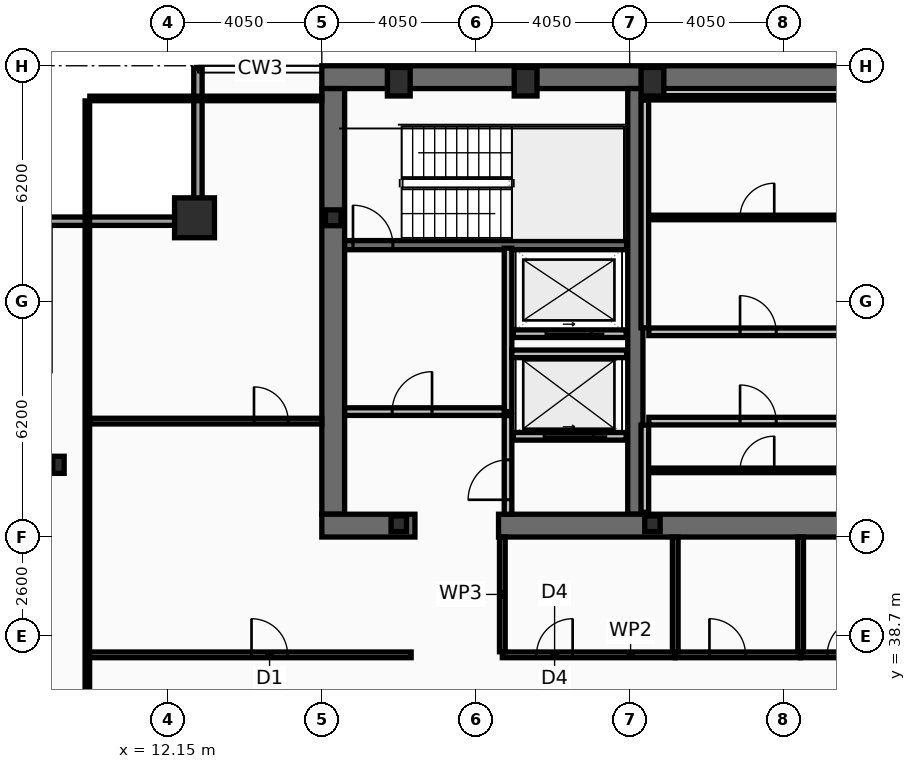
"""IFC4 building model, lengths in metres.
Left out: names, types, materials, properties, quantities, classifications, styles, units other than length and angle.
Written with IfcOpenShell. Run it as: python <this file> out.ifc"""

import sys

from ifc_helpers import new_model, si_unit, direction, frame, frame_2d, origin, origin_2d, place, context, subcontext, project, spatial, rectangle, hollow_rectangle, i_section, extrude, element, fill, save


model = new_model("IFC4")
c1 = context("Model", 3, precision=1e-05, world=origin(), true_north=direction((0.0, 1.0)))
c2 = subcontext(c1, "Body", "Model", "MODEL_VIEW")
j1 = project(units=[si_unit("LENGTHUNIT", "METRE"), si_unit("PLANEANGLEUNIT", "RADIAN")], contexts=[c1])
p1 = place(None, origin())
s1 = spatial("IfcSite", under=j1, at=p1, CompositionType="ELEMENT")
p2 = place(p1, origin())
s2 = spatial("IfcBuilding", under=s1, at=p2, CompositionType="ELEMENT")
p3 = place(p2, frame((0.0, 0.0, 246.2)))
s3 = spatial("IfcBuildingStorey", under=s2, at=p3, CompositionType="ELEMENT", Elevation=246.2)
p4 = place(p3, frame((16.2, 53.4, 0.0), z_axis=(0.0, 0.0, 1.0), x_axis=(1.0, 0.0, 0.0)))
e1 = element("IfcWall", 1, at=p4, inside=s3, PredefinedType="SHEAR", context=c2, shape_type="SweptSolid", body=[
    extrude(rectangle(XDim=40.5, YDim=0.6, at=frame_2d((20.25, 0.0))), origin(), (0.0, 0.0, 1.0), 3.44),
])
p5 = place(p3, frame((16.5, 41.9, 0.0), z_axis=(0.0, 0.0, 1.0), x_axis=(0.0, 1.0, 0.0)))
e2 = element("IfcWall", 2, at=p5, inside=s3, PredefinedType="SHEAR", context=c2, shape_type="SweptSolid", body=[
    extrude(rectangle(XDim=11.2, YDim=0.6, at=frame_2d((5.6, 0.0))), origin(), (0.0, 0.0, 1.0), 3.44),
])
p6 = place(p3, frame((24.45, 41.9, 0.0), z_axis=(0.0, 0.0, 1.0), x_axis=(0.0, 1.0, 0.0)))
e3 = element("IfcWall", 3, at=p6, inside=s3, PredefinedType="SHEAR", context=c2, shape_type="SweptSolid", body=[
    extrude(rectangle(XDim=11.2, YDim=0.4, at=frame_2d((5.6, 0.0))), origin(), (0.0, 0.0, 1.0), 3.44),
])
p7 = place(p3, frame((18.65, 41.6, 0.0), z_axis=(0.0, 0.0, 1.0), x_axis=(-1.0, 0.0, 0.0)))
e4 = element("IfcWall", 4, at=p7, inside=s3, PredefinedType="SHEAR", context=c2, shape_type="SweptSolid", body=[
    extrude(rectangle(XDim=2.45, YDim=0.6, at=frame_2d((1.225, 0.0))), origin(), (0.0, 0.0, 1.0), 3.44),
])
p8 = place(p3, frame((32.3, 41.6, 0.0), z_axis=(0.0, 0.0, 1.0), x_axis=(-1.0, 0.0, 0.0)))
e5 = element("IfcWall", 5, at=p8, inside=s3, PredefinedType="SHEAR", context=c2, shape_type="SweptSolid", body=[
    extrude(rectangle(XDim=11.45, YDim=0.6, at=frame_2d((5.725, 0.0))), origin(), (0.0, 0.0, 1.0), 3.44),
])
p9 = place(p3, frame((16.8, 48.98, 0.0), z_axis=(0.0, 0.0, 1.0), x_axis=(1.0, 0.0, 0.0)))
e6 = element("IfcWall", 6, at=p9, inside=s3, PredefinedType="SHEAR", context=c2, shape_type="SweptSolid", body=[
    extrude(rectangle(XDim=7.42, YDim=0.24, at=frame_2d((3.71, 0.0))), origin(), (0.0, 0.0, 1.0), 3.44),
])
p10 = place(p9, frame((0.22, 0.0, 0.0)))
e7 = element("IfcOpeningElement", 7, at=p10, cuts=e6, PredefinedType="OPENING", context=c2, shape_type="SweptSolid", body=[
    extrude(rectangle(XDim=1.05, YDim=2.15, at=frame_2d((0.525, 1.075))), frame((0.0, 0.13, 0.0), z_axis=(0.0, -1.0, 0.0), x_axis=(1.0, 0.0, 0.0)), (0.0, 0.0, 1.0), 0.26),
])
p11 = place(p3, frame((12.85, 49.7, 0.0), z_axis=(0.0, 0.0, 1.0), x_axis=(1.0, 0.0, 0.0)))
e8 = element("IfcColumn", 8, at=p11, inside=s3, PredefinedType="COLUMN", context=c2, shape_type="SweptSolid", body=[
    extrude(hollow_rectangle(XDim=1.05, YDim=1.05, WallThickness=0.055, at=origin_2d()), origin(), (0.0, 0.0, 1.0), 3.6),
])
for number, where, z_axis, x_axis in (
    (9, (18.225, 53.28, 0.0), (0.0, 0.0, 1.0), (1.0, 0.0, 0.0)),
    (10, (21.562, 53.28, 0.0), (0.0, 0.0, 1.0), (1.0, 0.0, 0.0)),
    (11, (24.9, 53.28, 0.0), (0.0, 0.0, 1.0), (1.0, 0.0, 0.0)),
):
    element("IfcColumn", number, at=place(p3, frame(where, z_axis=z_axis, x_axis=x_axis)), inside=s3, PredefinedType="COLUMN", context=c2, shape_type="SweptSolid", body=[
        extrude(hollow_rectangle(XDim=0.6, YDim=0.75, WallThickness=0.045, at=origin_2d()), origin(), (0.0, 0.0, 1.0), 3.6),
    ])
p12 = place(p3, frame((9.27, 43.2, 0.0), z_axis=(0.0, 0.0, 1.0), x_axis=(1.0, 0.0, 0.0)))
e12 = element("IfcColumn", 12, at=p12, inside=s3, PredefinedType="COLUMN", context=c2, shape_type="SweptSolid", body=[
    extrude(i_section(OverallWidth=0.3, OverallDepth=0.45, WebThickness=0.014, FlangeThickness=0.026, at=origin_2d()), origin(), (0.0, 0.0, 1.0), 3.6),
])
for number, where, z_axis, x_axis in (
    (13, (16.5, 49.7, 0.0), (0.0, 0.0, 1.0), (1.0, 0.0, 0.0)),
    (14, (18.225, 41.65, 0.0), (0.0, 0.0, 1.0), (1.0, 0.0, 0.0)),
    (15, (24.9, 41.65, 0.0), (0.0, 0.0, 1.0), (1.0, 0.0, 0.0)),
):
    element("IfcColumn", number, at=place(p3, frame(where, z_axis=z_axis, x_axis=x_axis)), inside=s3, PredefinedType="COLUMN", context=c2, shape_type="SweptSolid", body=[
        extrude(i_section(OverallWidth=0.406, OverallDepth=0.416, WebThickness=0.03, FlangeThickness=0.048, at=origin_2d()), origin(), (0.0, 0.0, 1.0), 3.6),
    ])
p13 = place(p3, frame((8.83, 49.61, 0.0), z_axis=(0.0, 0.0, 1.0), x_axis=(1.0, 0.0, 0.0)))
e16 = element("IfcWall", 16, at=p13, inside=s3, PredefinedType="SOLIDWALL", context=c2, shape_type="SweptSolid", body=[
    extrude(rectangle(XDim=4.22, YDim=0.22, at=frame_2d((2.11, 0.0))), origin(), (0.0, 0.0, 1.0), 2.83),
])
p14 = place(p3, frame((12.94, 49.72, 0.0), z_axis=(0.0, 0.0, 1.0), x_axis=(0.0, 1.0, 0.0)))
e17 = element("IfcWall", 17, at=p14, inside=s3, PredefinedType="SOLIDWALL", context=c2, shape_type="SweptSolid", body=[
    extrude(rectangle(XDim=3.91, YDim=0.22, at=frame_2d((1.955, 0.0))), origin(), (0.0, 0.0, 1.0), 2.83),
])
p15 = place(p3, frame((24.21, 43.95, 0.0), z_axis=(0.0, 0.0, 1.0), x_axis=(-1.0, 0.0, 0.0)))
e18 = element("IfcWall", 18, at=p15, inside=s3, PredefinedType="PARTITIONING", context=c2, shape_type="SweptSolid", body=[
    extrude(rectangle(XDim=2.97, YDim=0.2, at=frame_2d((1.485, 0.0))), origin(), (0.0, 0.0, 1.0), 3.44),
])
p16 = place(p15, frame((0.86, 0.0, 0.0)))
e19 = element("IfcOpeningElement", 19, at=p16, cuts=e18, PredefinedType="OPENING", context=c2, shape_type="SweptSolid", body=[
    extrude(rectangle(XDim=1.3, YDim=2.18, at=frame_2d((0.65, 1.09))), frame((0.0, 0.11, 0.0), z_axis=(0.0, -1.0, 0.0), x_axis=(1.0, 0.0, 0.0)), (0.0, 0.0, 1.0), 0.22),
])
p17 = place(p3, frame((24.21, 46.65, 0.0), z_axis=(0.0, 0.0, 1.0), x_axis=(-1.0, 0.0, 0.0)))
e20 = element("IfcWall", 20, at=p17, inside=s3, PredefinedType="PARTITIONING", context=c2, shape_type="SweptSolid", body=[
    extrude(rectangle(XDim=2.97, YDim=0.2, at=frame_2d((1.485, 0.0))), origin(), (0.0, 0.0, 1.0), 3.44),
])
p18 = place(p17, frame((0.91, 0.0, 0.0)))
e21 = element("IfcOpeningElement", 21, at=p18, cuts=e20, PredefinedType="OPENING", context=c2, shape_type="SweptSolid", body=[
    extrude(rectangle(XDim=1.2, YDim=2.18, at=frame_2d((0.6, 1.09))), frame((0.0, 0.11, 0.0), z_axis=(0.0, -1.0, 0.0), x_axis=(1.0, 0.0, 0.0)), (0.0, 0.0, 1.0), 0.22),
])
p19 = place(p3, frame((21.1, 44.6, 0.0), z_axis=(0.0, 0.0, 1.0), x_axis=(0.0, 1.0, 0.0)))
e22 = element("IfcWall", 22, at=p19, inside=s3, PredefinedType="PARTITIONING", context=c2, shape_type="SweptSolid", body=[
    extrude(rectangle(XDim=4.3, YDim=0.2, at=frame_2d((2.15, 0.0))), origin(), (0.0, 0.0, 1.0), 3.44),
])
p20 = place(p3, frame((16.8, 44.6, 0.0), z_axis=(0.0, 0.0, 1.0), x_axis=(1.0, 0.0, 0.0)))
e23 = element("IfcWall", 23, at=p20, inside=s3, PredefinedType="PARTITIONING", context=c2, shape_type="SweptSolid", body=[
    extrude(rectangle(XDim=4.2, YDim=0.2, at=frame_2d((2.1, 0.0))), origin(), (0.0, 0.0, 1.0), 3.44),
])
p21 = place(p20, frame((1.25, 0.0, 0.0)))
e24 = element("IfcOpeningElement", 24, at=p21, cuts=e23, PredefinedType="OPENING", context=c2, shape_type="SweptSolid", body=[
    extrude(rectangle(XDim=1.05, YDim=2.15, at=frame_2d((0.525, 1.075))), frame((0.0, 0.11, 0.0), z_axis=(0.0, -1.0, 0.0), x_axis=(1.0, 0.0, 0.0)), (0.0, 0.0, 1.0), 0.22),
])
p22 = place(p3, frame((21.2, 46.12, 0.0), z_axis=(0.0, 0.0, 1.0), x_axis=(1.0, 0.0, 0.0)))
e25 = element("IfcWall", 25, at=p22, inside=s3, PredefinedType="PARTITIONING", context=c2, shape_type="SweptSolid", body=[
    extrude(rectangle(XDim=3.02, YDim=0.2, at=frame_2d((1.51, 0.0))), origin(), (0.0, 0.0, 1.0), 3.44),
])
p23 = place(p3, frame((21.1, 41.9, 0.0), z_axis=(0.0, 0.0, 1.0), x_axis=(0.0, 1.0, 0.0)))
e26 = element("IfcWall", 26, at=p23, inside=s3, PredefinedType="PARTITIONING", context=c2, shape_type="SweptSolid", body=[
    extrude(rectangle(XDim=2.595, YDim=0.2, at=frame_2d((1.298, 0.0))), origin(), (0.0, 0.0, 1.0), 3.44),
])
p24 = place(p23, frame((0.38, 0.0, 0.0)))
e27 = element("IfcOpeningElement", 27, at=p24, cuts=e26, PredefinedType="OPENING", context=c2, shape_type="SweptSolid", body=[
    extrude(rectangle(XDim=1.05, YDim=2.15, at=frame_2d((0.525, 1.075))), frame((0.0, 0.11, 0.0), z_axis=(0.0, -1.0, 0.0), x_axis=(1.0, 0.0, 0.0)), (0.0, 0.0, 1.0), 0.22),
])
p25 = place(p3, frame((24.7, 46.805, 0.0), z_axis=(0.0, 0.0, 1.0), x_axis=(0.0, 1.0, 0.0)))
e28 = element("IfcWall", 28, at=p25, inside=s3, PredefinedType="PARTITIONING", context=c2, shape_type="SweptSolid", body=[
    extrude(rectangle(XDim=5.99, YDim=0.2, at=frame_2d((2.995, 0.0))), origin(), (0.0, 0.0, 1.0), 3.44),
])
p26 = place(p3, frame((24.805, 52.86, 0.0), z_axis=(0.0, 0.0, 1.0), x_axis=(1.0, 0.0, 0.0)))
e29 = element("IfcWall", 29, at=p26, inside=s3, PredefinedType="PARTITIONING", context=c2, shape_type="SweptSolid", body=[
    extrude(rectangle(XDim=7.51, YDim=0.12, at=frame_2d((3.755, 0.0))), origin(), (0.0, 0.0, 1.0), 3.44),
])
p27 = place(p3, frame((24.805, 49.709, 0.0), z_axis=(0.0, 0.0, 1.0), x_axis=(1.0, 0.0, 0.0)))
e30 = element("IfcWall", 30, at=p27, inside=s3, PredefinedType="PARTITIONING", context=c2, shape_type="SweptSolid", body=[
    extrude(rectangle(XDim=7.51, YDim=0.12, at=frame_2d((3.755, 0.0))), origin(), (0.0, 0.0, 1.0), 3.44),
])
p28 = place(p27, frame((2.4, 0.0, 0.0)))
e31 = element("IfcOpeningElement", 31, at=p28, cuts=e30, PredefinedType="OPENING", context=c2, shape_type="SweptSolid", body=[
    extrude(rectangle(XDim=0.9, YDim=2.05, at=frame_2d((0.45, 1.025))), frame((0.0, 0.07, 0.0), z_axis=(0.0, -1.0, 0.0), x_axis=(1.0, 0.0, 0.0)), (0.0, 0.0, 1.0), 0.14),
])
p29 = place(p3, frame((24.805, 46.7, 0.0), z_axis=(0.0, 0.0, 1.0), x_axis=(1.0, 0.0, 0.0)))
e32 = element("IfcWall", 32, at=p29, inside=s3, PredefinedType="PARTITIONING", context=c2, shape_type="SweptSolid", body=[
    extrude(rectangle(XDim=7.51, YDim=0.2, at=frame_2d((3.755, 0.0))), origin(), (0.0, 0.0, 1.0), 3.44),
])
p30 = place(p29, frame((2.4, 0.0, 0.0)))
e33 = element("IfcOpeningElement", 33, at=p30, cuts=e32, PredefinedType="OPENING", context=c2, shape_type="SweptSolid", body=[
    extrude(rectangle(XDim=0.95, YDim=2.1, at=frame_2d((0.475, 1.05))), frame((0.0, 0.11, 0.0), z_axis=(0.0, -1.0, 0.0), x_axis=(1.0, 0.0, 0.0)), (0.0, 0.0, 1.0), 0.22),
])
p31 = place(p3, frame((24.7, 41.95, 0.0), z_axis=(0.0, 0.0, 1.0), x_axis=(0.0, 1.0, 0.0)))
e34 = element("IfcWall", 34, at=p31, inside=s3, PredefinedType="PARTITIONING", context=c2, shape_type="SweptSolid", body=[
    extrude(rectangle(XDim=2.295, YDim=0.2, at=frame_2d((1.147, 0.0))), origin(), (0.0, 0.0, 1.0), 3.44),
])
p32 = place(p3, frame((24.805, 43.054, 0.0), z_axis=(0.0, 0.0, 1.0), x_axis=(1.0, 0.0, 0.0)))
e35 = element("IfcWall", 35, at=p32, inside=s3, PredefinedType="PARTITIONING", context=c2, shape_type="SweptSolid", body=[
    extrude(rectangle(XDim=7.34, YDim=0.12, at=frame_2d((3.67, 0.0))), origin(), (0.0, 0.0, 1.0), 3.44),
])
p33 = place(p32, frame((2.4, 0.0, 0.0)))
e36 = element("IfcOpeningElement", 36, at=p33, cuts=e35, PredefinedType="OPENING", context=c2, shape_type="SweptSolid", body=[
    extrude(rectangle(XDim=0.9, YDim=2.05, at=frame_2d((0.45, 1.025))), frame((0.0, 0.07, 0.0), z_axis=(0.0, -1.0, 0.0), x_axis=(1.0, 0.0, 0.0)), (0.0, 0.0, 1.0), 0.14),
])
p34 = place(p3, frame((24.805, 44.35, 0.0), z_axis=(0.0, 0.0, 1.0), x_axis=(1.0, 0.0, 0.0)))
e37 = element("IfcWall", 37, at=p34, inside=s3, PredefinedType="PARTITIONING", context=c2, shape_type="SweptSolid", body=[
    extrude(rectangle(XDim=7.34, YDim=0.2, at=frame_2d((3.67, 0.0))), origin(), (0.0, 0.0, 1.0), 3.44),
])
p35 = place(p34, frame((2.4, 0.0, 0.0)))
e38 = element("IfcOpeningElement", 38, at=p35, cuts=e37, PredefinedType="OPENING", context=c2, shape_type="SweptSolid", body=[
    extrude(rectangle(XDim=0.95, YDim=2.1, at=frame_2d((0.475, 1.05))), frame((0.0, 0.11, 0.0), z_axis=(0.0, -1.0, 0.0), x_axis=(1.0, 0.0, 0.0)), (0.0, 0.0, 1.0), 0.22),
])
p36 = place(p3, frame((20.95, 38.2, 0.0), z_axis=(0.0, 0.0, 1.0), x_axis=(1.0, 0.0, 0.0)))
e39 = element("IfcWall", 39, at=p36, inside=s3, PredefinedType="PARTITIONING", context=c2, shape_type="SweptSolid", body=[
    extrude(rectangle(XDim=4.55, YDim=0.15, at=frame_2d((2.275, 0.0))), origin(), (0.0, 0.0, 1.0), 2.78),
])
p37 = place(p36, frame((0.9, 0.0, 0.0)))
e40 = element("IfcOpeningElement", 40, at=p37, cuts=e39, PredefinedType="OPENING", context=c2, shape_type="SweptSolid", body=[
    extrude(rectangle(XDim=0.95, YDim=2.05, at=frame_2d((0.475, 1.025))), frame((0.0, 0.085, 0.0), z_axis=(0.0, -1.0, 0.0), x_axis=(1.0, 0.0, 0.0)), (0.0, 0.0, 1.0), 0.17),
])
p38 = place(p3, frame((25.5, 38.2, 0.0), z_axis=(0.0, 0.0, 1.0), x_axis=(1.0, 0.0, 0.0)))
e41 = element("IfcWall", 41, at=p38, inside=s3, PredefinedType="PARTITIONING", context=c2, shape_type="SweptSolid", body=[
    extrude(rectangle(XDim=3.3, YDim=0.15, at=frame_2d((1.65, 0.0))), origin(), (0.0, 0.0, 1.0), 3.44),
])
p39 = place(p38, frame((0.9, 0.0, 0.0)))
e42 = element("IfcOpeningElement", 42, at=p39, cuts=e41, PredefinedType="OPENING", context=c2, shape_type="SweptSolid", body=[
    extrude(rectangle(XDim=0.95, YDim=2.05, at=frame_2d((0.475, 1.025))), frame((0.0, 0.085, 0.0), z_axis=(0.0, -1.0, 0.0), x_axis=(1.0, 0.0, 0.0)), (0.0, 0.0, 1.0), 0.17),
])
p40 = place(p3, frame((28.8, 38.2, 0.0), z_axis=(0.0, 0.0, 1.0), x_axis=(1.0, 0.0, 0.0)))
e43 = element("IfcWall", 43, at=p40, inside=s3, PredefinedType="PARTITIONING", context=c2, shape_type="SweptSolid", body=[
    extrude(rectangle(XDim=3.38, YDim=0.15, at=frame_2d((1.69, 0.0))), origin(), (0.0, 0.0, 1.0), 2.78),
])
p41 = place(p40, frame((0.7, 0.0, 0.0)))
e44 = element("IfcOpeningElement", 44, at=p41, cuts=e43, PredefinedType="OPENING", context=c2, shape_type="SweptSolid", body=[
    extrude(rectangle(XDim=0.95, YDim=2.05, at=frame_2d((0.475, 1.025))), frame((0.0, 0.085, 0.0), z_axis=(0.0, -1.0, 0.0), x_axis=(1.0, 0.0, 0.0)), (0.0, 0.0, 1.0), 0.17),
])
for number, where, z_axis, x_axis in (
    (45, (20.95, 38.28, 0.0), (0.0, 0.0, 1.0), (0.0, 1.0, 0.0)),
    (46, (25.5, 38.28, 0.0), (0.0, 0.0, 1.0), (0.0, 1.0, 0.0)),
    (47, (28.8, 38.28, 0.0), (0.0, 0.0, 1.0), (0.0, 1.0, 0.0)),
):
    element("IfcWall", number, at=place(p3, frame(where, z_axis=z_axis, x_axis=x_axis)), inside=s3, PredefinedType="PARTITIONING", context=c2, shape_type="SweptSolid", body=[
        extrude(rectangle(XDim=3.02, YDim=0.15, at=frame_2d((1.51, 0.0))), origin(), (0.0, 0.0, 1.0), 3.44),
    ])
p42 = place(p3, frame((10.03, 38.2, 0.0), z_axis=(0.0, 0.0, 1.0), x_axis=(1.0, 0.0, 0.0)))
e48 = element("IfcWall", 48, at=p42, inside=s3, PredefinedType="PARTITIONING", context=c2, shape_type="SweptSolid", body=[
    extrude(rectangle(XDim=8.52, YDim=0.15, at=frame_2d((4.26, 0.0))), origin(), (0.0, 0.0, 1.0), 2.78),
])
p43 = place(p42, frame((4.32, 0.0, 0.0)))
e49 = element("IfcOpeningElement", 49, at=p43, cuts=e48, PredefinedType="OPENING", context=c2, shape_type="SweptSolid", body=[
    extrude(rectangle(XDim=0.95, YDim=2.05, at=frame_2d((0.475, 1.025))), frame((0.0, 0.085, 0.0), z_axis=(0.0, -1.0, 0.0), x_axis=(1.0, 0.0, 0.0)), (0.0, 0.0, 1.0), 0.17),
])
p44 = place(p3, frame((10.095, 44.35, 0.0), z_axis=(0.0, 0.0, 1.0), x_axis=(1.0, 0.0, 0.0)))
e50 = element("IfcWall", 50, at=p44, inside=s3, PredefinedType="PARTITIONING", context=c2, shape_type="SweptSolid", body=[
    extrude(rectangle(XDim=6.105, YDim=0.15, at=frame_2d((3.052, 0.0))), origin(), (0.0, 0.0, 1.0), 2.83),
])
p45 = place(p44, frame((4.32, 0.0, 0.0)))
e51 = element("IfcOpeningElement", 51, at=p45, cuts=e50, PredefinedType="OPENING", context=c2, shape_type="SweptSolid", body=[
    extrude(rectangle(XDim=0.9, YDim=2.05, at=frame_2d((0.45, 1.025))), frame((0.0, 0.085, 0.0), z_axis=(0.0, -1.0, 0.0), x_axis=(1.0, 0.0, 0.0)), (0.0, 0.0, 1.0), 0.17),
])
p46 = place(p3, frame((10.03, 10.665, 0.0), z_axis=(0.0, 0.0, 1.0), x_axis=(0.0, 1.0, 0.0)))
e52 = element("IfcWall", 52, at=p46, inside=s3, PredefinedType="PARTITIONING", context=c2, shape_type="SweptSolid", body=[
    extrude(rectangle(XDim=42.11, YDim=0.12, at=frame_2d((21.055, 0.0))), origin(), (0.0, 0.0, 1.0), 2.78),
])
p47 = place(p3, frame((10.095, 52.84, 0.0), z_axis=(0.0, 0.0, 1.0), x_axis=(1.0, 0.0, 0.0)))
e53 = element("IfcWall", 53, at=p47, inside=s3, PredefinedType="PARTITIONING", context=c2, shape_type="SweptSolid", body=[
    extrude(rectangle(XDim=6.105, YDim=0.12, at=frame_2d((3.052, 0.0))), origin(), (0.0, 0.0, 1.0), 3.44),
])
p48 = place(p10, origin())
e54 = element("IfcDoor", 54, at=p48, inside=s3, OperationType="SINGLE_SWING_LEFT", PredefinedType="DOOR", context=c2, shape_type="SweptSolid", body=[
    extrude(rectangle(XDim=1.05, YDim=2.15, at=frame_2d((0.525, 1.075))), frame((0.0, 0.025, 0.0), z_axis=(0.0, -1.0, 0.0), x_axis=(1.0, 0.0, 0.0)), (0.0, 0.0, 1.0), 0.05),
])
fill(e7, e54)
p49 = place(p16, origin())
e55 = element("IfcDoor", 55, at=p49, inside=s3, OperationType="SLIDING_TO_LEFT", PredefinedType="DOOR", context=c2, shape_type="SweptSolid", body=[
    extrude(rectangle(XDim=1.3, YDim=2.18, at=frame_2d((0.65, 1.09))), frame((0.0, 0.025, 0.0), z_axis=(0.0, -1.0, 0.0), x_axis=(1.0, 0.0, 0.0)), (0.0, 0.0, 1.0), 0.05),
])
fill(e19, e55)
p50 = place(p18, origin())
e56 = element("IfcDoor", 56, at=p50, inside=s3, OperationType="SLIDING_TO_LEFT", PredefinedType="DOOR", context=c2, shape_type="SweptSolid", body=[
    extrude(rectangle(XDim=1.2, YDim=2.18, at=frame_2d((0.6, 1.09))), frame((0.0, 0.025, 0.0), z_axis=(0.0, -1.0, 0.0), x_axis=(1.0, 0.0, 0.0)), (0.0, 0.0, 1.0), 0.05),
])
fill(e21, e56)
p51 = place(p21, origin())
e57 = element("IfcDoor", 57, at=p51, inside=s3, OperationType="SINGLE_SWING_RIGHT", PredefinedType="DOOR", context=c2, shape_type="SweptSolid", body=[
    extrude(rectangle(XDim=1.05, YDim=2.15, at=frame_2d((0.525, 1.075))), frame((0.0, 0.025, 0.0), z_axis=(0.0, -1.0, 0.0), x_axis=(1.0, 0.0, 0.0)), (0.0, 0.0, 1.0), 0.05),
])
fill(e24, e57)
p52 = place(p24, origin())
e58 = element("IfcDoor", 58, at=p52, inside=s3, OperationType="SINGLE_SWING_LEFT", PredefinedType="DOOR", context=c2, shape_type="SweptSolid", body=[
    extrude(rectangle(XDim=1.05, YDim=2.15, at=frame_2d((0.525, 1.075))), frame((0.0, 0.025, 0.0), z_axis=(0.0, -1.0, 0.0), x_axis=(1.0, 0.0, 0.0)), (0.0, 0.0, 1.0), 0.05),
])
fill(e27, e58)
p53 = place(p28, origin())
e59 = element("IfcDoor", 59, at=p53, inside=s3, OperationType="SINGLE_SWING_RIGHT", PredefinedType="DOOR", context=c2, shape_type="SweptSolid", body=[
    extrude(rectangle(XDim=0.9, YDim=2.05, at=frame_2d((0.45, 1.025))), frame((0.0, 0.025, 0.0), z_axis=(0.0, -1.0, 0.0), x_axis=(1.0, 0.0, 0.0)), (0.0, 0.0, 1.0), 0.05),
])
fill(e31, e59)
p54 = place(p30, origin())
e60 = element("IfcDoor", 60, at=p54, inside=s3, OperationType="SINGLE_SWING_LEFT", PredefinedType="DOOR", context=c2, shape_type="SweptSolid", body=[
    extrude(rectangle(XDim=0.95, YDim=2.1, at=frame_2d((0.475, 1.05))), frame((0.0, 0.025, 0.0), z_axis=(0.0, -1.0, 0.0), x_axis=(1.0, 0.0, 0.0)), (0.0, 0.0, 1.0), 0.05),
])
fill(e33, e60)
p55 = place(p33, origin())
e61 = element("IfcDoor", 61, at=p55, inside=s3, OperationType="SINGLE_SWING_RIGHT", PredefinedType="DOOR", context=c2, shape_type="SweptSolid", body=[
    extrude(rectangle(XDim=0.9, YDim=2.05, at=frame_2d((0.45, 1.025))), frame((0.0, 0.025, 0.0), z_axis=(0.0, -1.0, 0.0), x_axis=(1.0, 0.0, 0.0)), (0.0, 0.0, 1.0), 0.05),
])
fill(e36, e61)
p56 = place(p35, origin())
e62 = element("IfcDoor", 62, at=p56, inside=s3, OperationType="SINGLE_SWING_LEFT", PredefinedType="DOOR", context=c2, shape_type="SweptSolid", body=[
    extrude(rectangle(XDim=0.95, YDim=2.1, at=frame_2d((0.475, 1.05))), frame((0.0, 0.025, 0.0), z_axis=(0.0, -1.0, 0.0), x_axis=(1.0, 0.0, 0.0)), (0.0, 0.0, 1.0), 0.05),
])
fill(e38, e62)
p57 = place(p37, origin())
e63 = element("IfcDoor", 63, at=p57, inside=s3, OperationType="SINGLE_SWING_RIGHT", PredefinedType="DOOR", context=c2, shape_type="SweptSolid", body=[
    extrude(rectangle(XDim=0.95, YDim=2.05, at=frame_2d((0.475, 1.025))), frame((0.0, 0.025, 0.0), z_axis=(0.0, -1.0, 0.0), x_axis=(1.0, 0.0, 0.0)), (0.0, 0.0, 1.0), 0.05),
])
fill(e40, e63)
p58 = place(p39, origin())
e64 = element("IfcDoor", 64, at=p58, inside=s3, OperationType="SINGLE_SWING_LEFT", PredefinedType="DOOR", context=c2, shape_type="SweptSolid", body=[
    extrude(rectangle(XDim=0.95, YDim=2.05, at=frame_2d((0.475, 1.025))), frame((0.0, 0.025, 0.0), z_axis=(0.0, -1.0, 0.0), x_axis=(1.0, 0.0, 0.0)), (0.0, 0.0, 1.0), 0.05),
])
fill(e42, e64)
p59 = place(p41, origin())
e65 = element("IfcDoor", 65, at=p59, inside=s3, OperationType="SINGLE_SWING_RIGHT", PredefinedType="DOOR", context=c2, shape_type="SweptSolid", body=[
    extrude(rectangle(XDim=0.95, YDim=2.05, at=frame_2d((0.475, 1.025))), frame((0.0, 0.025, 0.0), z_axis=(0.0, -1.0, 0.0), x_axis=(1.0, 0.0, 0.0)), (0.0, 0.0, 1.0), 0.05),
])
fill(e44, e65)
p60 = place(p43, origin())
e66 = element("IfcDoor", 66, at=p60, inside=s3, OperationType="SINGLE_SWING_LEFT", PredefinedType="DOOR", context=c2, shape_type="SweptSolid", body=[
    extrude(rectangle(XDim=0.95, YDim=2.05, at=frame_2d((0.475, 1.025))), frame((0.0, 0.025, 0.0), z_axis=(0.0, -1.0, 0.0), x_axis=(1.0, 0.0, 0.0)), (0.0, 0.0, 1.0), 0.05),
])
fill(e49, e66)
p61 = place(p45, origin())
e67 = element("IfcDoor", 67, at=p61, inside=s3, OperationType="SINGLE_SWING_LEFT", PredefinedType="DOOR", context=c2, shape_type="SweptSolid", body=[
    extrude(rectangle(XDim=0.9, YDim=2.05, at=frame_2d((0.45, 1.025))), frame((0.0, 0.025, 0.0), z_axis=(0.0, -1.0, 0.0), x_axis=(1.0, 0.0, 0.0)), (0.0, 0.0, 1.0), 0.05),
])
fill(e51, e67)
save(model, sys.argv[1])
